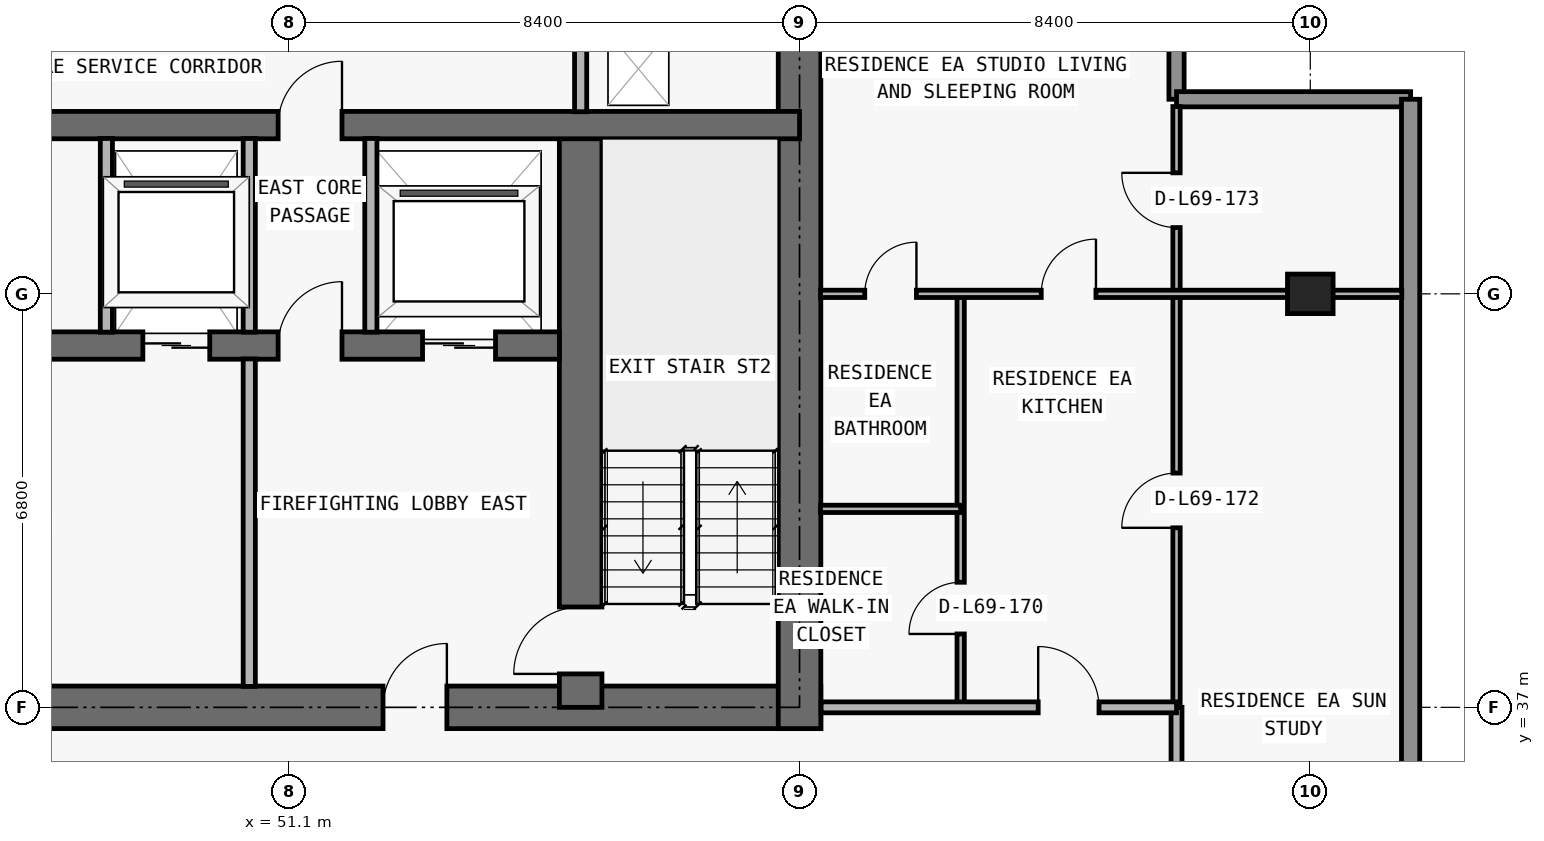
"""IFC4 building model, lengths in metres.
Left out: names, types, materials, properties, quantities, classifications, styles, units other than length and angle.
Written with IfcOpenShell. Run it as: python <this file> out.ifc"""

import sys

from ifc_helpers import new_model, si_unit, direction, frame, frame_2d, origin, origin_2d, place, context, subcontext, project, spatial, rectangle, extrude, element, fill, save


model = new_model("IFC4")
c1 = context("Model", 3, precision=1e-05, world=origin(), true_north=direction((0.0, 1.0)))
c2 = subcontext(c1, "Body", "Model", "MODEL_VIEW")
j1 = project(units=[si_unit("LENGTHUNIT", "METRE"), si_unit("PLANEANGLEUNIT", "RADIAN")], contexts=[c1])
p1 = place(None, origin())
s1 = spatial("IfcSite", under=j1, at=p1, CompositionType="ELEMENT")
p2 = place(p1, origin())
s2 = spatial("IfcBuilding", under=s1, at=p2, CompositionType="ELEMENT")
p3 = place(p2, frame((0.0, 0.0, 246.3)))
s3 = spatial("IfcBuildingStorey", under=s2, at=p3, CompositionType="ELEMENT", Elevation=246.3)
p4 = place(p3, frame((67.9, 43.8, 0.0), z_axis=(0.0, 0.0, 1.0), x_axis=(1.0, 0.0, 0.0)))
e1 = element("IfcColumn", 1, at=p4, inside=s3, PredefinedType="COLUMN", context=c2, shape_type="SweptSolid", body=[
    extrude(rectangle(XDim=0.75, YDim=0.65, at=origin_2d()), origin(), (0.0, 0.0, 1.0), 3.05),
])
p5 = place(p3, frame((17.95, 37.0, 0.0), z_axis=(0.0, 0.0, 1.0), x_axis=(1.0, 0.0, 0.0)))
e2 = element("IfcWall", 2, at=p5, inside=s3, PredefinedType="SHEAR", context=c2, shape_type="SweptSolid", body=[
    extrude(rectangle(XDim=41.9, YDim=0.7, at=frame_2d((20.95, 0.0))), origin(), (0.0, 0.0, 1.0), 3.05),
])
p6 = place(p5, frame((14.35, 0.0, 0.0)))
e3 = element("IfcOpeningElement", 3, at=p6, cuts=e2, PredefinedType="OPENING", context=c2, shape_type="SweptSolid", body=[
    extrude(rectangle(XDim=1.1, YDim=2.15, at=frame_2d((0.55, 1.075))), frame((0.0, 0.36, 0.0), z_axis=(0.0, -1.0, 0.0), x_axis=(1.0, 0.0, 0.0)), (0.0, 0.0, 1.0), 0.72),
])
p7 = place(p5, frame((6.2, 0.0, 0.0)))
e4 = element("IfcOpeningElement", 4, at=p7, cuts=e2, PredefinedType="OPENING", context=c2, shape_type="SweptSolid", body=[
    extrude(rectangle(XDim=1.05, YDim=2.15, at=frame_2d((0.525, 1.075))), frame((0.0, 0.36, 0.0), z_axis=(0.0, -1.0, 0.0), x_axis=(1.0, 0.0, 0.0)), (0.0, 0.0, 1.0), 0.72),
])
p8 = place(p5, frame((34.7, 0.0, 0.0)))
e5 = element("IfcOpeningElement", 5, at=p8, cuts=e2, PredefinedType="OPENING", context=c2, shape_type="SweptSolid", body=[
    extrude(rectangle(XDim=1.05, YDim=2.15, at=frame_2d((0.525, 1.075))), frame((0.0, 0.36, 0.0), z_axis=(0.0, -1.0, 0.0), x_axis=(1.0, 0.0, 0.0)), (0.0, 0.0, 1.0), 0.72),
])
p9 = place(p5, frame((10.812, 0.0, 0.0)))
e6 = element("IfcOpeningElement", 6, at=p9, cuts=e2, PredefinedType="OPENING", context=c2, shape_type="SweptSolid", body=[
    extrude(rectangle(XDim=1.05, YDim=2.15, at=frame_2d((0.525, 1.075))), frame((0.0, 0.36, 0.0), z_axis=(0.0, -1.0, 0.0), x_axis=(1.0, 0.0, 0.0)), (0.0, 0.0, 1.0), 0.72),
])
p10 = place(p5, frame((24.05, 0.0, 0.0)))
e7 = element("IfcOpeningElement", 7, at=p10, cuts=e2, PredefinedType="OPENING", context=c2, shape_type="SweptSolid", body=[
    extrude(rectangle(XDim=1.05, YDim=2.15, at=frame_2d((0.525, 1.075))), frame((0.0, 0.36, 0.0), z_axis=(0.0, -1.0, 0.0), x_axis=(1.0, 0.0, 0.0)), (0.0, 0.0, 1.0), 0.72),
])
p11 = place(p3, frame((59.5, 36.65, 0.0), z_axis=(0.0, 0.0, 1.0), x_axis=(0.0, 1.0, 0.0)))
e8 = element("IfcWall", 8, at=p11, inside=s3, PredefinedType="SHEAR", context=c2, shape_type="SweptSolid", body=[
    extrude(rectangle(XDim=13.95, YDim=0.7, at=frame_2d((6.975, 0.0))), origin(), (0.0, 0.0, 1.0), 3.05),
])
p12 = place(p3, frame((55.9, 37.0, 0.0), z_axis=(0.0, 0.0, 1.0), x_axis=(0.0, 1.0, 0.0)))
e9 = element("IfcWall", 9, at=p12, inside=s3, PredefinedType="SHEAR", context=c2, shape_type="SweptSolid", body=[
    extrude(rectangle(XDim=9.575, YDim=0.7, at=frame_2d((4.788, 0.0))), origin(), (0.0, 0.0, 1.0), 3.05),
])
p13 = place(p12, frame((0.55, 0.0, 0.0)))
e10 = element("IfcOpeningElement", 10, at=p13, cuts=e9, PredefinedType="OPENING", context=c2, shape_type="SweptSolid", body=[
    extrude(rectangle(XDim=1.1, YDim=2.15, at=frame_2d((0.55, 1.075))), frame((0.0, 0.36, 0.0), z_axis=(0.0, -1.0, 0.0), x_axis=(1.0, 0.0, 0.0)), (0.0, 0.0, 1.0), 0.72),
])
p14 = place(p3, frame((22.25, 42.95, 0.0), z_axis=(0.0, 0.0, 1.0), x_axis=(1.0, 0.0, 0.0)))
e11 = element("IfcWall", 11, at=p14, inside=s3, PredefinedType="SHEAR", context=c2, shape_type="SweptSolid", body=[
    extrude(rectangle(XDim=33.3, YDim=0.45, at=frame_2d((16.65, 0.0))), origin(), (0.0, 0.0, 1.0), 3.05),
])
p15 = place(p14, frame((1.05, 0.0, 0.0)))
e12 = element("IfcOpeningElement", 12, at=p15, cuts=e11, PredefinedType="OPENING", context=c2, shape_type="SweptSolid", body=[
    extrude(rectangle(XDim=1.2, YDim=2.2, at=frame_2d((0.6, 1.1))), frame((0.0, 0.235, 0.0), z_axis=(0.0, -1.0, 0.0), x_axis=(1.0, 0.0, 0.0)), (0.0, 0.0, 1.0), 0.47),
])
p16 = place(p14, frame((31.05, 0.0, 0.0)))
e13 = element("IfcOpeningElement", 13, at=p16, cuts=e11, PredefinedType="OPENING", context=c2, shape_type="SweptSolid", body=[
    extrude(rectangle(XDim=1.2, YDim=2.2, at=frame_2d((0.6, 1.1))), frame((0.0, 0.235, 0.0), z_axis=(0.0, -1.0, 0.0), x_axis=(1.0, 0.0, 0.0)), (0.0, 0.0, 1.0), 0.47),
])
p17 = place(p14, frame((26.45, 0.0, 0.0)))
e14 = element("IfcOpeningElement", 14, at=p17, cuts=e11, PredefinedType="OPENING", context=c2, shape_type="SweptSolid", body=[
    extrude(rectangle(XDim=1.1, YDim=2.2, at=frame_2d((0.55, 1.1))), frame((0.0, 0.235, 0.0), z_axis=(0.0, -1.0, 0.0), x_axis=(1.0, 0.0, 0.0)), (0.0, 0.0, 1.0), 0.47),
])
p18 = place(p14, frame((5.95, 0.0, 0.0)))
e15 = element("IfcOpeningElement", 15, at=p18, cuts=e11, PredefinedType="OPENING", context=c2, shape_type="SweptSolid", body=[
    extrude(rectangle(XDim=1.1, YDim=2.2, at=frame_2d((0.55, 1.1))), frame((0.0, 0.235, 0.0), z_axis=(0.0, -1.0, 0.0), x_axis=(1.0, 0.0, 0.0)), (0.0, 0.0, 1.0), 0.47),
])
p19 = place(p14, frame((3.625, 0.0, 0.0)))
e16 = element("IfcOpeningElement", 16, at=p19, cuts=e11, PredefinedType="OPENING", context=c2, shape_type="SweptSolid", body=[
    extrude(rectangle(XDim=1.05, YDim=2.15, at=frame_2d((0.525, 1.075))), frame((0.0, 0.235, 0.0), z_axis=(0.0, -1.0, 0.0), x_axis=(1.0, 0.0, 0.0)), (0.0, 0.0, 1.0), 0.47),
])
p20 = place(p14, frame((28.675, 0.0, 0.0)))
e17 = element("IfcOpeningElement", 17, at=p20, cuts=e11, PredefinedType="OPENING", context=c2, shape_type="SweptSolid", body=[
    extrude(rectangle(XDim=1.05, YDim=2.15, at=frame_2d((0.525, 1.075))), frame((0.0, 0.235, 0.0), z_axis=(0.0, -1.0, 0.0), x_axis=(1.0, 0.0, 0.0)), (0.0, 0.0, 1.0), 0.47),
])
p21 = place(p14, frame((14.7, 0.0, 0.0)))
e18 = element("IfcOpeningElement", 18, at=p21, cuts=e11, PredefinedType="OPENING", context=c2, shape_type="SweptSolid", body=[
    extrude(rectangle(XDim=1.0, YDim=2.2, at=frame_2d((0.5, 1.1))), frame((0.0, 0.235, 0.0), z_axis=(0.0, -1.0, 0.0), x_axis=(1.0, 0.0, 0.0)), (0.0, 0.0, 1.0), 0.47),
])
p22 = place(p14, frame((21.45, 0.0, 0.0)))
e19 = element("IfcOpeningElement", 19, at=p22, cuts=e11, PredefinedType="OPENING", context=c2, shape_type="SweptSolid", body=[
    extrude(rectangle(XDim=1.0, YDim=2.2, at=frame_2d((0.5, 1.1))), frame((0.0, 0.235, 0.0), z_axis=(0.0, -1.0, 0.0), x_axis=(1.0, 0.0, 0.0)), (0.0, 0.0, 1.0), 0.47),
])
p23 = place(p3, frame((18.3, 46.575, 0.0), z_axis=(0.0, 0.0, 1.0), x_axis=(1.0, 0.0, 0.0)))
e20 = element("IfcWall", 20, at=p23, inside=s3, PredefinedType="SHEAR", context=c2, shape_type="SweptSolid", body=[
    extrude(rectangle(XDim=41.2, YDim=0.45, at=frame_2d((20.6, 0.0))), origin(), (0.0, 0.0, 1.0), 3.05),
])
p24 = place(p23, frame((7.6, 0.0, 0.0)))
e21 = element("IfcOpeningElement", 21, at=p24, cuts=e20, PredefinedType="OPENING", context=c2, shape_type="SweptSolid", body=[
    extrude(rectangle(XDim=1.0, YDim=2.2, at=frame_2d((0.5, 1.1))), frame((0.0, 0.235, 0.0), z_axis=(0.0, -1.0, 0.0), x_axis=(1.0, 0.0, 0.0)), (0.0, 0.0, 1.0), 0.47),
])
p25 = place(p23, frame((32.625, 0.0, 0.0)))
e22 = element("IfcOpeningElement", 22, at=p25, cuts=e20, PredefinedType="OPENING", context=c2, shape_type="SweptSolid", body=[
    extrude(rectangle(XDim=1.05, YDim=2.15, at=frame_2d((0.525, 1.075))), frame((0.0, 0.235, 0.0), z_axis=(0.0, -1.0, 0.0), x_axis=(1.0, 0.0, 0.0)), (0.0, 0.0, 1.0), 0.47),
])
p26 = place(p3, frame((65.7, 50.45, 0.0), z_axis=(0.0, 0.0, 1.0), x_axis=(0.0, -1.0, 0.0)))
e23 = element("IfcWall", 23, at=p26, inside=s3, PredefinedType="ELEMENTEDWALL", context=c2, shape_type="SweptSolid", body=[
    extrude(rectangle(XDim=3.45, YDim=0.25, at=frame_2d((1.725, 0.0))), origin(), (0.0, 0.0, 1.0), 3.05),
])
p27 = place(p3, frame((65.7, 47.0, 0.0), z_axis=(0.0, 0.0, 1.0), x_axis=(1.0, 0.0, 0.0)))
e24 = element("IfcWall", 24, at=p27, inside=s3, PredefinedType="ELEMENTEDWALL", context=c2, shape_type="SweptSolid", body=[
    extrude(rectangle(XDim=3.85, YDim=0.25, at=frame_2d((1.925, 0.0))), origin(), (0.0, 0.0, 1.0), 3.05),
])
p28 = place(p3, frame((69.55, 47.0, 0.0), z_axis=(0.0, 0.0, 1.0), x_axis=(0.0, -1.0, 0.0)))
e25 = element("IfcWall", 25, at=p28, inside=s3, PredefinedType="STANDARD", context=c2, shape_type="SweptSolid", body=[
    extrude(rectangle(XDim=16.85, YDim=0.3, at=frame_2d((8.425, 0.0))), origin(), (0.0, 0.0, 1.0), 3.05),
])
p29 = place(p3, frame((48.1, 43.17, 0.0), z_axis=(0.0, 0.0, 1.0), x_axis=(0.0, 1.0, 0.0)))
e26 = element("IfcWall", 26, at=p29, inside=s3, PredefinedType="PARTITIONING", context=c2, shape_type="SweptSolid", body=[
    extrude(rectangle(XDim=3.185, YDim=0.2, at=frame_2d((1.593, 0.0))), origin(), (0.0, 0.0, 1.0), 3.05),
])
p30 = place(p3, frame((50.45, 37.345, 0.0), z_axis=(0.0, 0.0, 1.0), x_axis=(0.0, 1.0, 0.0)))
e27 = element("IfcWall", 27, at=p30, inside=s3, PredefinedType="PARTITIONING", context=c2, shape_type="SweptSolid", body=[
    extrude(rectangle(XDim=5.385, YDim=0.2, at=frame_2d((2.692, 0.0))), origin(), (0.0, 0.0, 1.0), 3.05),
])
for number, where, z_axis, x_axis in (
    (28, (50.45, 43.17, 0.0), (0.0, 0.0, 1.0), (0.0, 1.0, 0.0)),
    (29, (52.45, 43.17, 0.0), (0.0, 0.0, 1.0), (0.0, 1.0, 0.0)),
):
    element("IfcWall", number, at=place(p3, frame(where, z_axis=z_axis, x_axis=x_axis)), inside=s3, PredefinedType="PARTITIONING", context=c2, shape_type="SweptSolid", body=[
        extrude(rectangle(XDim=3.185, YDim=0.2, at=frame_2d((1.593, 0.0))), origin(), (0.0, 0.0, 1.0), 3.05),
    ])
p31 = place(p3, frame((55.9, 46.795, 0.0), z_axis=(0.0, 0.0, 1.0), x_axis=(0.0, 1.0, 0.0)))
e30 = element("IfcWall", 30, at=p31, inside=s3, PredefinedType="PARTITIONING", context=c2, shape_type="SweptSolid", body=[
    extrude(rectangle(XDim=3.16, YDim=0.2, at=frame_2d((1.58, 0.0))), origin(), (0.0, 0.0, 1.0), 3.05),
])
p32 = place(p3, frame((62.15, 37.0, 0.0), z_axis=(0.0, 0.0, 1.0), x_axis=(0.0, 1.0, 0.0)))
e31 = element("IfcWall", 31, at=p32, inside=s3, PredefinedType="PARTITIONING", context=c2, shape_type="SweptSolid", body=[
    extrude(rectangle(XDim=6.8, YDim=0.12, at=frame_2d((3.4, 0.0))), origin(), (0.0, 0.0, 1.0), 3.05),
])
p33 = place(p32, frame((1.207, 0.0, 0.0)))
e32 = element("IfcOpeningElement", 32, at=p33, cuts=e31, PredefinedType="OPENING", context=c2, shape_type="SweptSolid", body=[
    extrude(rectangle(XDim=0.85, YDim=2.1, at=frame_2d((0.425, 1.05))), frame((0.0, 0.07, 0.0), z_axis=(0.0, -1.0, 0.0), x_axis=(1.0, 0.0, 0.0)), (0.0, 0.0, 1.0), 0.14),
])
p34 = place(p3, frame((65.7, 33.705, 0.0), z_axis=(0.0, 0.0, 1.0), x_axis=(0.0, 1.0, 0.0)))
e33 = element("IfcWall", 33, at=p34, inside=s3, PredefinedType="PARTITIONING", context=c2, shape_type="SweptSolid", body=[
    extrude(rectangle(XDim=3.295, YDim=0.18, at=frame_2d((1.647, 0.0))), origin(), (0.0, 0.0, 1.0), 2.629),
])
p35 = place(p3, frame((65.7, 37.005, 0.0), z_axis=(0.0, 0.0, 1.0), x_axis=(0.0, 1.0, 0.0)))
e34 = element("IfcWall", 34, at=p35, inside=s3, PredefinedType="PARTITIONING", context=c2, shape_type="SweptSolid", body=[
    extrude(rectangle(XDim=9.875, YDim=0.12, at=frame_2d((4.938, 0.0))), origin(), (0.0, 0.0, 1.0), 2.629),
])
p36 = place(p35, frame((2.948, 0.0, 0.0)))
e35 = element("IfcOpeningElement", 35, at=p36, cuts=e34, PredefinedType="OPENING", context=c2, shape_type="SweptSolid", body=[
    extrude(rectangle(XDim=0.9, YDim=2.15, at=frame_2d((0.45, 1.075))), frame((0.0, 0.07, 0.0), z_axis=(0.0, -1.0, 0.0), x_axis=(1.0, 0.0, 0.0)), (0.0, 0.0, 1.0), 0.14),
])
p37 = place(p35, frame((7.885, 0.0, 0.0)))
e36 = element("IfcOpeningElement", 36, at=p37, cuts=e34, PredefinedType="OPENING", context=c2, shape_type="SweptSolid", body=[
    extrude(rectangle(XDim=0.9, YDim=2.15, at=frame_2d((0.45, 1.075))), frame((0.0, 0.07, 0.0), z_axis=(0.0, -1.0, 0.0), x_axis=(1.0, 0.0, 0.0)), (0.0, 0.0, 1.0), 0.14),
])
p38 = place(p3, frame((59.855, 37.0, 0.0), z_axis=(0.0, 0.0, 1.0), x_axis=(1.0, 0.0, 0.0)))
e37 = element("IfcWall", 37, at=p38, inside=s3, PredefinedType="PARTITIONING", context=c2, shape_type="SweptSolid", body=[
    extrude(rectangle(XDim=5.845, YDim=0.18, at=frame_2d((2.922, 0.0))), origin(), (0.0, 0.0, 1.0), 3.05),
])
p39 = place(p38, frame((3.57, 0.0, 0.0)))
e38 = element("IfcOpeningElement", 38, at=p39, cuts=e37, PredefinedType="OPENING", context=c2, shape_type="SweptSolid", body=[
    extrude(rectangle(XDim=1.0, YDim=2.2, at=frame_2d((0.5, 1.1))), frame((0.0, 0.1, 0.0), z_axis=(0.0, -1.0, 0.0), x_axis=(1.0, 0.0, 0.0)), (0.0, 0.0, 1.0), 0.2),
])
p40 = place(p3, frame((59.845, 40.264, 0.0), z_axis=(0.0, 0.0, 1.0), x_axis=(1.0, 0.0, 0.0)))
e39 = element("IfcWall", 39, at=p40, inside=s3, PredefinedType="PARTITIONING", context=c2, shape_type="SweptSolid", body=[
    extrude(rectangle(XDim=2.305, YDim=0.12, at=frame_2d((1.152, 0.0))), origin(), (0.0, 0.0, 1.0), 3.05),
])
p41 = place(p3, frame((59.845, 43.8, 0.0), z_axis=(0.0, 0.0, 1.0), x_axis=(1.0, 0.0, 0.0)))
e40 = element("IfcWall", 40, at=p41, inside=s3, PredefinedType="PARTITIONING", context=c2, shape_type="SweptSolid", body=[
    extrude(rectangle(XDim=9.56, YDim=0.12, at=frame_2d((4.78, 0.0))), origin(), (0.0, 0.0, 1.0), 2.418),
])
p42 = place(p41, frame((3.63, 0.0, 0.0)))
e41 = element("IfcOpeningElement", 41, at=p42, cuts=e40, PredefinedType="OPENING", context=c2, shape_type="SweptSolid", body=[
    extrude(rectangle(XDim=0.9, YDim=2.15, at=frame_2d((0.45, 1.075))), frame((0.0, 0.07, 0.0), z_axis=(0.0, -1.0, 0.0), x_axis=(1.0, 0.0, 0.0)), (0.0, 0.0, 1.0), 0.14),
])
p43 = place(p41, frame((0.728, 0.0, 0.0)))
e42 = element("IfcOpeningElement", 42, at=p43, cuts=e40, PredefinedType="OPENING", context=c2, shape_type="SweptSolid", body=[
    extrude(rectangle(XDim=0.85, YDim=2.1, at=frame_2d((0.425, 1.05))), frame((0.0, 0.07, 0.0), z_axis=(0.0, -1.0, 0.0), x_axis=(1.0, 0.0, 0.0)), (0.0, 0.0, 1.0), 0.14),
])
p44 = place(p16, origin())
e43 = element("IfcDoor", 43, at=p44, inside=s3, OperationType="DOUBLE_DOOR_SLIDING", PredefinedType="DOOR", context=c2, shape_type="SweptSolid", body=[
    extrude(rectangle(XDim=1.2, YDim=2.2, at=frame_2d((0.6, 1.1))), frame((0.0, 0.025, 0.0), z_axis=(0.0, -1.0, 0.0), x_axis=(1.0, 0.0, 0.0)), (0.0, 0.0, 1.0), 0.05),
])
fill(e13, e43)
p45 = place(p17, origin())
e44 = element("IfcDoor", 44, at=p45, inside=s3, OperationType="DOUBLE_DOOR_SLIDING", PredefinedType="DOOR", context=c2, shape_type="SweptSolid", body=[
    extrude(rectangle(XDim=1.1, YDim=2.2, at=frame_2d((0.55, 1.1))), frame((0.0, 0.025, 0.0), z_axis=(0.0, -1.0, 0.0), x_axis=(1.0, 0.0, 0.0)), (0.0, 0.0, 1.0), 0.05),
])
fill(e14, e44)
p46 = place(p8, origin())
e45 = element("IfcDoor", 45, at=p46, inside=s3, OperationType="SINGLE_SWING_RIGHT", PredefinedType="DOOR", context=c2, shape_type="SweptSolid", body=[
    extrude(rectangle(XDim=1.05, YDim=2.15, at=frame_2d((0.525, 1.075))), frame((0.0, 0.025, 0.0), z_axis=(0.0, -1.0, 0.0), x_axis=(1.0, 0.0, 0.0)), (0.0, 0.0, 1.0), 0.05),
])
fill(e5, e45)
p47 = place(p13, origin())
e46 = element("IfcDoor", 46, at=p47, inside=s3, OperationType="SINGLE_SWING_LEFT", PredefinedType="DOOR", context=c2, shape_type="SweptSolid", body=[
    extrude(rectangle(XDim=1.1, YDim=2.15, at=frame_2d((0.55, 1.075))), frame((0.0, 0.025, 0.0), z_axis=(0.0, -1.0, 0.0), x_axis=(1.0, 0.0, 0.0)), (0.0, 0.0, 1.0), 0.05),
])
fill(e10, e46)
p48 = place(p20, origin())
e47 = element("IfcDoor", 47, at=p48, inside=s3, OperationType="SINGLE_SWING_RIGHT", PredefinedType="DOOR", context=c2, shape_type="SweptSolid", body=[
    extrude(rectangle(XDim=1.05, YDim=2.15, at=frame_2d((0.525, 1.075))), frame((0.0, 0.025, 0.0), z_axis=(0.0, -1.0, 0.0), x_axis=(1.0, 0.0, 0.0)), (0.0, 0.0, 1.0), 0.05),
])
fill(e17, e47)
p49 = place(p25, origin())
e48 = element("IfcDoor", 48, at=p49, inside=s3, OperationType="SINGLE_SWING_RIGHT", PredefinedType="DOOR", context=c2, shape_type="SweptSolid", body=[
    extrude(rectangle(XDim=1.05, YDim=2.15, at=frame_2d((0.525, 1.075))), frame((0.0, 0.025, 0.0), z_axis=(0.0, -1.0, 0.0), x_axis=(1.0, 0.0, 0.0)), (0.0, 0.0, 1.0), 0.05),
])
fill(e22, e48)
p50 = place(p39, origin())
e49 = element("IfcDoor", 49, at=p50, inside=s3, OperationType="SINGLE_SWING_LEFT", PredefinedType="DOOR", context=c2, shape_type="SweptSolid", body=[
    extrude(rectangle(XDim=1.0, YDim=2.2, at=frame_2d((0.5, 1.1))), frame((0.0, 0.025, 0.0), z_axis=(0.0, -1.0, 0.0), x_axis=(1.0, 0.0, 0.0)), (0.0, 0.0, 1.0), 0.05),
])
fill(e38, e49)
p51 = place(p42, origin())
e50 = element("IfcDoor", 50, at=p51, inside=s3, OperationType="SINGLE_SWING_RIGHT", PredefinedType="DOOR", context=c2, shape_type="SweptSolid", body=[
    extrude(rectangle(XDim=0.9, YDim=2.15, at=frame_2d((0.45, 1.075))), frame((0.0, 0.025, 0.0), z_axis=(0.0, -1.0, 0.0), x_axis=(1.0, 0.0, 0.0)), (0.0, 0.0, 1.0), 0.05),
])
fill(e41, e50)
p52 = place(p33, origin())
e51 = element("IfcDoor", 51, at=p52, inside=s3, OperationType="SINGLE_SWING_LEFT", PredefinedType="DOOR", context=c2, shape_type="SweptSolid", body=[
    extrude(rectangle(XDim=0.85, YDim=2.1, at=frame_2d((0.425, 1.05))), frame((0.0, 0.025, 0.0), z_axis=(0.0, -1.0, 0.0), x_axis=(1.0, 0.0, 0.0)), (0.0, 0.0, 1.0), 0.05),
])
fill(e32, e51)
p53 = place(p43, origin())
e52 = element("IfcDoor", 52, at=p53, inside=s3, OperationType="SINGLE_SWING_RIGHT", PredefinedType="DOOR", context=c2, shape_type="SweptSolid", body=[
    extrude(rectangle(XDim=0.85, YDim=2.1, at=frame_2d((0.425, 1.05))), frame((0.0, 0.025, 0.0), z_axis=(0.0, -1.0, 0.0), x_axis=(1.0, 0.0, 0.0)), (0.0, 0.0, 1.0), 0.05),
])
fill(e42, e52)
p54 = place(p36, origin())
e53 = element("IfcDoor", 53, at=p54, inside=s3, OperationType="SINGLE_SWING_LEFT", PredefinedType="DOOR", context=c2, shape_type="SweptSolid", body=[
    extrude(rectangle(XDim=0.9, YDim=2.15, at=frame_2d((0.45, 1.075))), frame((0.0, 0.025, 0.0), z_axis=(0.0, -1.0, 0.0), x_axis=(1.0, 0.0, 0.0)), (0.0, 0.0, 1.0), 0.05),
])
fill(e35, e53)
p55 = place(p37, origin())
e54 = element("IfcDoor", 54, at=p55, inside=s3, OperationType="SINGLE_SWING_RIGHT", PredefinedType="DOOR", context=c2, shape_type="SweptSolid", body=[
    extrude(rectangle(XDim=0.9, YDim=2.15, at=frame_2d((0.45, 1.075))), frame((0.0, 0.025, 0.0), z_axis=(0.0, -1.0, 0.0), x_axis=(1.0, 0.0, 0.0)), (0.0, 0.0, 1.0), 0.05),
])
fill(e36, e54)
save(model, sys.argv[1])
